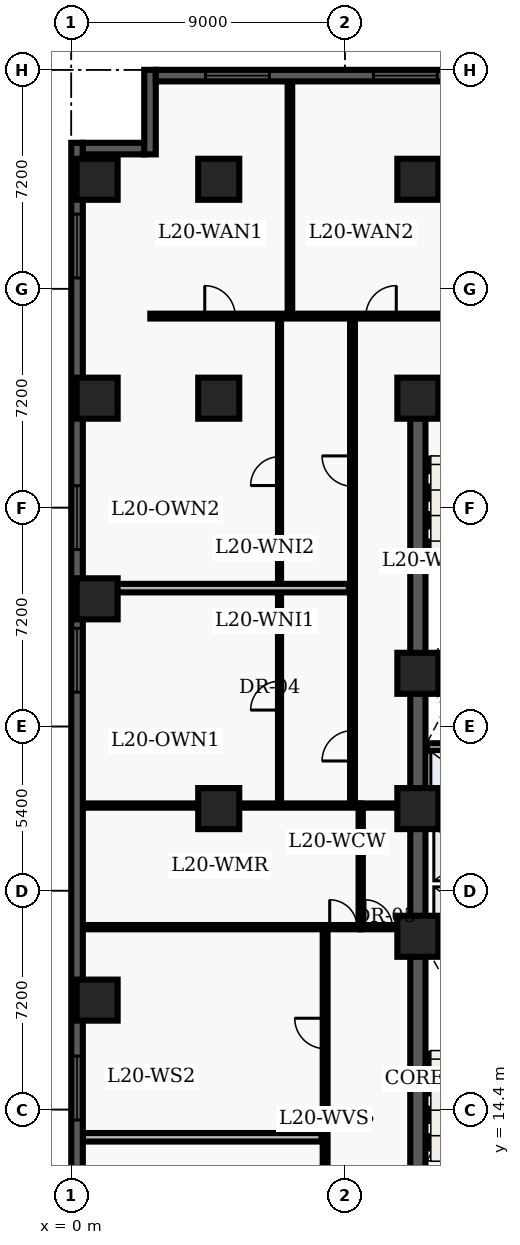
"""IFC4 building model, lengths in metres.
Left out: names, types, materials, properties, quantities, classifications, styles, units other than length and angle.
Written with IfcOpenShell. Run it as: python <this file> out.ifc"""

import sys

from ifc_helpers import new_model, entity, si_unit, converted_unit, direction, frame, origin_with_axes, origin_2d_with_axis, place, context, subcontext, project, spatial, polyline, rectangle, outline, extrude, element, fill, save


model = new_model("IFC4")
c1 = context("Model", 3, precision=1e-05, world=origin_with_axes(), true_north=direction((0.0, 1.0)))
c2 = subcontext(c1, "Body", "Model", "MODEL_VIEW")
j1 = project(units=[si_unit("LENGTHUNIT", "METRE"), converted_unit("PLANEANGLEUNIT", "DEGREE", entity("IfcPlaneAngleMeasure", 0.017), si_unit("PLANEANGLEUNIT", "RADIAN"), dimensions=[0, 0, 0, 0, 0, 0, 0])], contexts=[c1])
p1 = place(None, origin_with_axes())
s1 = spatial("IfcSite", under=j1, at=p1, CompositionType="ELEMENT")
p2 = place(p1, origin_with_axes())
s2 = spatial("IfcBuilding", under=s1, at=p2, CompositionType="ELEMENT")
p3 = place(p2, frame((0.0, 0.0, 84.6), z_axis=(0.0, 0.0, 1.0), x_axis=(1.0, 0.0, 0.0)))
s3 = spatial("IfcBuildingStorey", under=s2, at=p3, CompositionType="ELEMENT", Elevation=84.6)
p4 = place(p3, frame((11.4, 10.8, 0.0), z_axis=(0.0, 0.0, 1.0), x_axis=(0.0, 1.0, 0.0)))
e1 = element("IfcWall", 1, at=p4, inside=s3, PredefinedType="SHEAR", context=c2, shape_type="SweptSolid", body=[
    extrude(outline(polyline([(0.0, -0.25), (27.0, -0.25), (27.0, 0.25), (0.0, 0.25), (0.0, -0.25)])), origin_with_axes(), (0.0, 0.0, 1.0), 4.26),
])
p5 = place(p3, frame((11.4, 37.8, 0.0), z_axis=(0.0, 0.0, 1.0), x_axis=(1.0, 0.0, 0.0)))
e2 = element("IfcWall", 2, at=p5, inside=s3, PredefinedType="SHEAR", context=c2, shape_type="SweptSolid", body=[
    extrude(outline(polyline([(0.0, -0.25), (7.2, -0.25), (7.2, 0.25), (0.0, 0.25), (0.0, -0.25)])), origin_with_axes(), (0.0, 0.0, 1.0), 4.26),
])
p6 = place(p5, frame((2.625, 0.0, 0.0), z_axis=(0.0, 0.0, 1.0), x_axis=(1.0, 0.0, 0.0)))
e3 = element("IfcOpeningElement", 3, at=p6, cuts=e2, PredefinedType="OPENING", context=c2, shape_type="SweptSolid", body=[
    extrude(rectangle(XDim=1.05, YDim=0.52, at=origin_2d_with_axis()), origin_with_axes(), (0.0, 0.0, 1.0), 2.15),
])
for number, where, z_axis, x_axis in (
    (4, (11.65, 19.825, 0.0), (0.0, 0.0, 1.0), (1.0, 0.0, 0.0)),
    (5, (11.65, 28.775, 0.0), (0.0, 0.0, 1.0), (1.0, 0.0, 0.0)),
):
    element("IfcWall", number, at=place(p3, frame(where, z_axis=z_axis, x_axis=x_axis)), inside=s3, PredefinedType="SHEAR", context=c2, shape_type="SweptSolid", body=[
        extrude(outline(polyline([(0.0, -0.125), (6.7, -0.125), (6.7, 0.125), (0.0, 0.125), (0.0, -0.125)])), origin_with_axes(), (0.0, 0.0, 1.0), 4.26),
    ])
p7 = place(p3, frame((11.7, 24.1, 0.0), z_axis=(0.0, 0.0, 1.0), x_axis=(1.0, 0.0, 0.0)))
e6 = element("IfcWall", 6, at=p7, inside=s3, PredefinedType="SOLIDWALL", context=c2, shape_type="SweptSolid", body=[
    extrude(outline(polyline([(0.0, -0.125), (6.6, -0.125), (6.6, 0.125), (0.0, 0.125), (0.0, -0.125)])), origin_with_axes(), (0.0, 0.0, 1.0), 3.3),
])
p8 = place(p7, frame((3.75, 0.0, 0.0), z_axis=(0.0, 0.0, 1.0), x_axis=(1.0, 0.0, 0.0)))
e7 = element("IfcOpeningElement", 7, at=p8, cuts=e6, PredefinedType="OPENING", context=c2, shape_type="SweptSolid", body=[
    extrude(rectangle(XDim=0.9, YDim=0.27, at=origin_2d_with_axis()), origin_with_axes(), (0.0, 0.0, 1.0), 2.15),
])
p9 = place(p3, frame((11.7, 26.325, 0.0), z_axis=(0.0, 0.0, 1.0), x_axis=(1.0, 0.0, 0.0)))
e8 = element("IfcWall", 8, at=p9, inside=s3, PredefinedType="SOLIDWALL", context=c2, shape_type="SweptSolid", body=[
    extrude(outline(polyline([(0.0, -0.125), (6.6, -0.125), (6.6, 0.125), (0.0, 0.125), (0.0, -0.125)])), origin_with_axes(), (0.0, 0.0, 1.0), 3.3),
])
p10 = place(p9, frame((3.5, 0.0, 0.0), z_axis=(0.0, 0.0, 1.0), x_axis=(1.0, 0.0, 0.0)))
e9 = element("IfcOpeningElement", 9, at=p10, cuts=e8, PredefinedType="OPENING", context=c2, shape_type="SweptSolid", body=[
    extrude(rectangle(XDim=0.9, YDim=0.27, at=origin_2d_with_axis()), origin_with_axes(), (0.0, 0.0, 1.0), 2.15),
])
for number, where, z_axis, x_axis in (
    (10, (11.4, 20.1, 0.0), (0.0, 0.0, 1.0), (1.0, 0.0, 0.0)),
    (11, (11.4, 24.3, 0.0), (0.0, 0.0, 1.0), (1.0, 0.0, 0.0)),
    (12, (11.4, 28.75, 0.0), (0.0, 0.0, 1.0), (1.0, 0.0, 0.0)),
    (13, (11.4, 37.8, 0.0), (0.0, 0.0, 1.0), (1.0, 0.0, 0.0)),
    (14, (11.4, 45.0, 0.0), (0.0, 0.0, 1.0), (1.0, 0.0, 0.0)),
    (15, (4.85, 24.3, 0.0), (0.0, 0.0, 1.0), (1.0, 0.0, 0.0)),
    (16, (4.85, 37.8, 0.0), (0.0, 0.0, 1.0), (1.0, 0.0, 0.0)),
    (17, (4.85, 45.0, 0.0), (0.0, 0.0, 1.0), (1.0, 0.0, 0.0)),
    (18, (0.85, 18.0, 0.0), (0.0, 0.0, 1.0), (1.0, 0.0, 0.0)),
    (19, (0.85, 31.2, 0.0), (0.0, 0.0, 1.0), (1.0, 0.0, 0.0)),
    (20, (0.85, 37.8, 0.0), (0.0, 0.0, 1.0), (1.0, 0.0, 0.0)),
    (21, (0.85, 45.0, 0.0), (0.0, 0.0, 1.0), (1.0, 0.0, 0.0)),
):
    element("IfcColumn", number, at=place(p3, frame(where, z_axis=z_axis, x_axis=x_axis)), inside=s3, PredefinedType="COLUMN", context=c2, shape_type="SweptSolid", body=[
        extrude(rectangle(XDim=1.35, YDim=1.35, at=origin_2d_with_axis()), origin_with_axes(), (0.0, 0.0, 1.0), 4.5),
    ])
p11 = place(p3, frame((9.52, 20.4, 0.0), z_axis=(0.0, 0.0, 1.0), x_axis=(0.0, 1.0, 0.0)))
e22 = element("IfcWall", 22, at=p11, inside=s3, PredefinedType="PARTITIONING", context=c2, shape_type="SweptSolid", body=[
    extrude(outline(polyline([(0.0, -0.07), (4.0, -0.07), (4.0, 0.07), (0.0, 0.07), (0.0, -0.07)])), origin_with_axes(), (0.0, 0.0, 1.0), 3.2),
])
p12 = place(p3, frame((9.52, 20.4, 0.0), z_axis=(0.0, 0.0, 1.0), x_axis=(1.0, 0.0, 0.0)))
e23 = element("IfcWall", 23, at=p12, inside=s3, PredefinedType="PARTITIONING", context=c2, shape_type="SweptSolid", body=[
    extrude(outline(polyline([(0.0, -0.07), (1.58, -0.07), (1.58, 0.07), (0.0, 0.07), (0.0, -0.07)])), origin_with_axes(), (0.0, 0.0, 1.0), 3.2),
])
p13 = place(p12, frame((0.59, 0.0, 0.0), z_axis=(0.0, 0.0, 1.0), x_axis=(1.0, 0.0, 0.0)))
e24 = element("IfcOpeningElement", 24, at=p13, cuts=e23, PredefinedType="OPENING", context=c2, shape_type="SweptSolid", body=[
    extrude(rectangle(XDim=0.9, YDim=0.16, at=origin_2d_with_axis()), origin_with_axes(), (0.0, 0.0, 1.0), 2.15),
])
p14 = place(p3, frame((9.52, 24.4, 0.0), z_axis=(0.0, 0.0, 1.0), x_axis=(1.0, 0.0, 0.0)))
e25 = element("IfcWall", 25, at=p14, inside=s3, PredefinedType="PARTITIONING", context=c2, shape_type="SweptSolid", body=[
    extrude(outline(polyline([(0.0, -0.07), (1.58, -0.07), (1.58, 0.07), (0.0, 0.07), (0.0, -0.07)])), origin_with_axes(), (0.0, 0.0, 1.0), 3.2),
])
p15 = place(p3, frame((2.6, 40.5, 0.0), z_axis=(0.0, 0.0, 1.0), x_axis=(1.0, 0.0, 0.0)))
e26 = element("IfcWall", 26, at=p15, inside=s3, PredefinedType="PARTITIONING", context=c2, shape_type="SweptSolid", body=[
    extrude(outline(polyline([(0.0, -0.08), (18.65, -0.08), (18.65, 0.08), (0.0, 0.08), (0.0, -0.08)])), origin_with_axes(), (0.0, 0.0, 1.0), 3.2),
])
p16 = place(p15, frame((2.291, 0.0, 0.0), z_axis=(0.0, 0.0, 1.0), x_axis=(1.0, 0.0, 0.0)))
e27 = element("IfcOpeningElement", 27, at=p16, cuts=e26, PredefinedType="OPENING", context=c2, shape_type="SweptSolid", body=[
    extrude(rectangle(XDim=1.0, YDim=0.18, at=origin_2d_with_axis()), origin_with_axes(), (0.0, 0.0, 1.0), 2.15),
])
p17 = place(p15, frame((7.59, 0.0, 0.0), z_axis=(0.0, 0.0, 1.0), x_axis=(1.0, 0.0, 0.0)))
e28 = element("IfcOpeningElement", 28, at=p17, cuts=e26, PredefinedType="OPENING", context=c2, shape_type="SweptSolid", body=[
    extrude(rectangle(XDim=1.0, YDim=0.18, at=origin_2d_with_axis()), origin_with_axes(), (0.0, 0.0, 1.0), 2.15),
])
p18 = place(p15, frame((13.223, 0.0, 0.0), z_axis=(0.0, 0.0, 1.0), x_axis=(1.0, 0.0, 0.0)))
e29 = element("IfcOpeningElement", 29, at=p18, cuts=e26, PredefinedType="OPENING", context=c2, shape_type="SweptSolid", body=[
    extrude(rectangle(XDim=1.2, YDim=0.18, at=origin_2d_with_axis()), origin_with_axes(), (0.0, 0.0, 1.0), 2.2),
])
p19 = place(p3, frame((8.35, 7.8, 0.0), z_axis=(0.0, 0.0, 1.0), x_axis=(0.0, 1.0, 0.0)))
e30 = element("IfcWall", 30, at=p19, inside=s3, PredefinedType="PARTITIONING", context=c2, shape_type="SweptSolid", body=[
    extrude(outline(polyline([(0.0, -0.08), (12.6, -0.08), (12.6, 0.08), (0.0, 0.08), (0.0, -0.08)])), origin_with_axes(), (0.0, 0.0, 1.0), 3.2),
])
p20 = place(p19, frame((2.909, 0.0, 0.0), z_axis=(0.0, 0.0, 1.0), x_axis=(1.0, 0.0, 0.0)))
e31 = element("IfcOpeningElement", 31, at=p20, cuts=e30, PredefinedType="OPENING", context=c2, shape_type="SweptSolid", body=[
    extrude(rectangle(XDim=1.0, YDim=0.18, at=origin_2d_with_axis()), origin_with_axes(), (0.0, 0.0, 1.0), 2.15),
])
p21 = place(p19, frame((9.104, 0.0, 0.0), z_axis=(0.0, 0.0, 1.0), x_axis=(1.0, 0.0, 0.0)))
e32 = element("IfcOpeningElement", 32, at=p21, cuts=e30, PredefinedType="OPENING", context=c2, shape_type="SweptSolid", body=[
    extrude(rectangle(XDim=1.0, YDim=0.18, at=origin_2d_with_axis()), origin_with_axes(), (0.0, 0.0, 1.0), 2.15),
])
p22 = place(p3, frame((9.25, 24.4, 0.0), z_axis=(0.0, 0.0, 1.0), x_axis=(0.0, 1.0, 0.0)))
e33 = element("IfcWall", 33, at=p22, inside=s3, PredefinedType="PARTITIONING", context=c2, shape_type="SweptSolid", body=[
    extrude(outline(polyline([(0.0, -0.08), (16.1, -0.08), (16.1, 0.08), (0.0, 0.08), (0.0, -0.08)])), origin_with_axes(), (0.0, 0.0, 1.0), 3.2),
])
p23 = place(p22, frame((1.966, 0.0, 0.0), z_axis=(0.0, 0.0, 1.0), x_axis=(1.0, 0.0, 0.0)))
e34 = element("IfcOpeningElement", 34, at=p23, cuts=e33, PredefinedType="OPENING", context=c2, shape_type="SweptSolid", body=[
    extrude(rectangle(XDim=1.0, YDim=0.18, at=origin_2d_with_axis()), origin_with_axes(), (0.0, 0.0, 1.0), 2.15),
])
p24 = place(p22, frame((11.001, 0.0, 0.0), z_axis=(0.0, 0.0, 1.0), x_axis=(1.0, 0.0, 0.0)))
e35 = element("IfcOpeningElement", 35, at=p24, cuts=e33, PredefinedType="OPENING", context=c2, shape_type="SweptSolid", body=[
    extrude(rectangle(XDim=1.0, YDim=0.18, at=origin_2d_with_axis()), origin_with_axes(), (0.0, 0.0, 1.0), 2.15),
])
p25 = place(p3, frame((0.36, 20.4, 0.0), z_axis=(0.0, 0.0, 1.0), x_axis=(1.0, 0.0, 0.0)))
e36 = element("IfcWall", 36, at=p25, inside=s3, PredefinedType="PARTITIONING", context=c2, shape_type="SweptSolid", body=[
    extrude(outline(polyline([(0.0, -0.07), (9.16, -0.07), (9.16, 0.07), (0.0, 0.07), (0.0, -0.07)])), origin_with_axes(), (0.0, 0.0, 1.0), 3.2),
])
p26 = place(p25, frame((8.59, 0.0, 0.0), z_axis=(0.0, 0.0, 1.0), x_axis=(1.0, 0.0, 0.0)))
e37 = element("IfcOpeningElement", 37, at=p26, cuts=e36, PredefinedType="OPENING", context=c2, shape_type="SweptSolid", body=[
    extrude(rectangle(XDim=0.9, YDim=0.16, at=origin_2d_with_axis()), origin_with_axes(), (0.0, 0.0, 1.0), 2.15),
])
p27 = place(p3, frame((0.36, 24.4, 0.0), z_axis=(0.0, 0.0, 1.0), x_axis=(1.0, 0.0, 0.0)))
e38 = element("IfcWall", 38, at=p27, inside=s3, PredefinedType="PARTITIONING", context=c2, shape_type="SweptSolid", body=[
    extrude(outline(polyline([(0.0, -0.07), (9.16, -0.07), (9.16, 0.07), (0.0, 0.07), (0.0, -0.07)])), origin_with_axes(), (0.0, 0.0, 1.0), 3.2),
])
p28 = place(p3, frame((0.375, 13.488, 0.0), z_axis=(0.0, 0.0, 1.0), x_axis=(1.0, 0.0, 0.0)))
e39 = element("IfcWall", 39, at=p28, inside=s3, PredefinedType="PARTITIONING", context=c2, shape_type="SweptSolid", body=[
    extrude(outline(polyline([(0.0, -0.14), (7.855, -0.14), (7.855, 0.14), (0.0, 0.14), (0.0, -0.14)])), origin_with_axes(), (0.0, 0.0, 1.0), 3.2),
])
p29 = place(p3, frame((6.85, 24.55, 0.0), z_axis=(0.0, 0.0, 1.0), x_axis=(0.0, 1.0, 0.0)))
e40 = element("IfcWall", 40, at=p29, inside=s3, PredefinedType="PARTITIONING", context=c2, shape_type="SweptSolid", body=[
    extrude(outline(polyline([(0.0, -0.05), (15.75, -0.05), (15.75, 0.05), (0.0, 0.05), (0.0, -0.05)])), origin_with_axes(), (0.0, 0.0, 1.0), 3.2),
])
p30 = place(p29, frame((3.466, 0.0, 0.0), z_axis=(0.0, 0.0, 1.0), x_axis=(1.0, 0.0, 0.0)))
e41 = element("IfcOpeningElement", 41, at=p30, cuts=e40, PredefinedType="OPENING", context=c2, shape_type="SweptSolid", body=[
    extrude(rectangle(XDim=0.95, YDim=0.12, at=origin_2d_with_axis()), origin_with_axes(), (0.0, 0.0, 1.0), 2.15),
])
p31 = place(p29, frame((10.851, 0.0, 0.0), z_axis=(0.0, 0.0, 1.0), x_axis=(1.0, 0.0, 0.0)))
e42 = element("IfcOpeningElement", 42, at=p31, cuts=e40, PredefinedType="OPENING", context=c2, shape_type="SweptSolid", body=[
    extrude(rectangle(XDim=0.95, YDim=0.12, at=origin_2d_with_axis()), origin_with_axes(), (0.0, 0.0, 1.0), 2.15),
])
p32 = place(p3, frame((0.375, 31.552, 0.0), z_axis=(0.0, 0.0, 1.0), x_axis=(1.0, 0.0, 0.0)))
e43 = element("IfcWall", 43, at=p32, inside=s3, PredefinedType="PARTITIONING", context=c2, shape_type="SweptSolid", body=[
    extrude(outline(polyline([(0.0, -0.14), (8.755, -0.14), (8.755, 0.14), (0.0, 0.14), (0.0, -0.14)])), origin_with_axes(), (0.0, 0.0, 1.0), 3.2),
])
p33 = place(p3, frame((7.192, 40.6, 0.0), z_axis=(0.0, 0.0, 1.0), x_axis=(0.0, 1.0, 0.0)))
e44 = element("IfcWall", 44, at=p33, inside=s3, PredefinedType="PARTITIONING", context=c2, shape_type="SweptSolid", body=[
    extrude(outline(polyline([(0.0, -0.075), (7.64, -0.075), (7.64, 0.075), (0.0, 0.075), (0.0, -0.075)])), origin_with_axes(), (0.0, 0.0, 1.0), 3.2),
])
p34 = place(p3, frame((0.19, 2.78, 0.0), z_axis=(0.0, 0.0, 1.0), x_axis=(0.0, 1.0, 0.0)))
e45 = element("IfcWall", 45, at=p34, inside=s3, PredefinedType="SOLIDWALL", context=c2, shape_type="SweptSolid", body=[
    extrude(outline(polyline([(0.0, -0.19), (43.42, -0.19), (43.42, 0.19), (0.0, 0.19), (0.0, -0.19)])), origin_with_axes(), (0.0, 0.0, 1.0), 4.26),
])
p35 = place(p34, frame((2.946, 0.0, 0.45), z_axis=(0.0, 0.0, 1.0), x_axis=(1.0, 0.0, 0.0)))
e46 = element("IfcOpeningElement", 46, at=p35, cuts=e45, PredefinedType="OPENING", context=c2, shape_type="SweptSolid", body=[
    extrude(rectangle(XDim=2.1, YDim=0.4, at=origin_2d_with_axis()), origin_with_axes(), (0.0, 0.0, 1.0), 2.2),
])
p36 = place(p34, frame((12.328, 0.0, 0.45), z_axis=(0.0, 0.0, 1.0), x_axis=(1.0, 0.0, 0.0)))
e47 = element("IfcOpeningElement", 47, at=p36, cuts=e45, PredefinedType="OPENING", context=c2, shape_type="SweptSolid", body=[
    extrude(rectangle(XDim=2.1, YDim=0.4, at=origin_2d_with_axis()), origin_with_axes(), (0.0, 0.0, 1.0), 2.2),
])
p37 = place(p34, frame((26.401, 0.0, 0.45), z_axis=(0.0, 0.0, 1.0), x_axis=(1.0, 0.0, 0.0)))
e48 = element("IfcOpeningElement", 48, at=p37, cuts=e45, PredefinedType="OPENING", context=c2, shape_type="SweptSolid", body=[
    extrude(rectangle(XDim=2.1, YDim=0.4, at=origin_2d_with_axis()), origin_with_axes(), (0.0, 0.0, 1.0), 2.2),
])
p38 = place(p34, frame((31.092, 0.0, 0.45), z_axis=(0.0, 0.0, 1.0), x_axis=(1.0, 0.0, 0.0)))
e49 = element("IfcOpeningElement", 49, at=p38, cuts=e45, PredefinedType="OPENING", context=c2, shape_type="SweptSolid", body=[
    extrude(rectangle(XDim=2.1, YDim=0.4, at=origin_2d_with_axis()), origin_with_axes(), (0.0, 0.0, 1.0), 2.2),
])
p39 = place(p34, frame((40.024, 0.0, 0.45), z_axis=(0.0, 0.0, 1.0), x_axis=(1.0, 0.0, 0.0)))
e50 = element("IfcOpeningElement", 50, at=p39, cuts=e45, PredefinedType="OPENING", context=c2, shape_type="SweptSolid", body=[
    extrude(rectangle(XDim=2.1, YDim=0.4, at=origin_2d_with_axis()), origin_with_axes(), (0.0, 0.0, 1.0), 2.2),
])
p40 = place(p3, frame((0.38, 46.01, 0.0), z_axis=(0.0, 0.0, 1.0), x_axis=(1.0, 0.0, 0.0)))
e51 = element("IfcWall", 51, at=p40, inside=s3, PredefinedType="SOLIDWALL", context=c2, shape_type="SweptSolid", body=[
    extrude(outline(polyline([(0.0, -0.19), (2.02, -0.19), (2.02, 0.19), (0.0, 0.19), (0.0, -0.19)])), origin_with_axes(), (0.0, 0.0, 1.0), 4.26),
])
p41 = place(p3, frame((2.59, 45.82, 0.0), z_axis=(0.0, 0.0, 1.0), x_axis=(0.0, 1.0, 0.0)))
e52 = element("IfcWall", 52, at=p41, inside=s3, PredefinedType="SOLIDWALL", context=c2, shape_type="SweptSolid", body=[
    extrude(outline(polyline([(0.0, -0.19), (2.78, -0.19), (2.78, 0.19), (0.0, 0.19), (0.0, -0.19)])), origin_with_axes(), (0.0, 0.0, 1.0), 4.26),
])
p42 = place(p3, frame((2.78, 48.41, 0.0), z_axis=(0.0, 0.0, 1.0), x_axis=(1.0, 0.0, 0.0)))
e53 = element("IfcWall", 53, at=p42, inside=s3, PredefinedType="SOLIDWALL", context=c2, shape_type="SweptSolid", body=[
    extrude(outline(polyline([(0.0, -0.19), (16.42, -0.19), (16.42, 0.19), (0.0, 0.19), (0.0, -0.19)])), origin_with_axes(), (0.0, 0.0, 1.0), 4.26),
])
p43 = place(p42, frame((2.687, 0.0, 0.45), z_axis=(0.0, 0.0, 1.0), x_axis=(1.0, 0.0, 0.0)))
e54 = element("IfcOpeningElement", 54, at=p43, cuts=e53, PredefinedType="OPENING", context=c2, shape_type="SweptSolid", body=[
    extrude(rectangle(XDim=2.1, YDim=0.4, at=origin_2d_with_axis()), origin_with_axes(), (0.0, 0.0, 1.0), 2.2),
])
p44 = place(p42, frame((8.21, 0.0, 0.45), z_axis=(0.0, 0.0, 1.0), x_axis=(1.0, 0.0, 0.0)))
e55 = element("IfcOpeningElement", 55, at=p44, cuts=e53, PredefinedType="OPENING", context=c2, shape_type="SweptSolid", body=[
    extrude(rectangle(XDim=2.1, YDim=0.4, at=origin_2d_with_axis()), origin_with_axes(), (0.0, 0.0, 1.0), 2.2),
])
p45 = place(p42, frame((13.283, 0.0, 0.45), z_axis=(0.0, 0.0, 1.0), x_axis=(1.0, 0.0, 0.0)))
e56 = element("IfcOpeningElement", 56, at=p45, cuts=e53, PredefinedType="OPENING", context=c2, shape_type="SweptSolid", body=[
    extrude(rectangle(XDim=2.1, YDim=0.4, at=origin_2d_with_axis()), origin_with_axes(), (0.0, 0.0, 1.0), 2.2),
])
p46 = place(p12, frame((0.59, 0.0, 0.0), z_axis=(0.0, 0.0, 1.0), x_axis=(1.0, 0.0, 0.0)))
e57 = element("IfcDoor", 57, at=p46, inside=s3, OperationType="SINGLE_SWING_LEFT", PredefinedType="DOOR", context=c2, shape_type="SweptSolid", body=[
    extrude(rectangle(XDim=0.9, YDim=0.084, at=origin_2d_with_axis()), origin_with_axes(), (0.0, 0.0, 1.0), 2.15),
])
fill(e24, e57)
p47 = place(p25, frame((8.59, 0.0, 0.0), z_axis=(0.0, 0.0, 1.0), x_axis=(1.0, 0.0, 0.0)))
e58 = element("IfcDoor", 58, at=p47, inside=s3, OperationType="SINGLE_SWING_LEFT", PredefinedType="DOOR", context=c2, shape_type="SweptSolid", body=[
    extrude(rectangle(XDim=0.9, YDim=0.084, at=origin_2d_with_axis()), origin_with_axes(), (0.0, 0.0, 1.0), 2.15),
])
fill(e37, e58)
p48 = place(p19, frame((9.104, 0.0, 0.0), z_axis=(0.0, 0.0, 1.0), x_axis=(1.0, 0.0, 0.0)))
e59 = element("IfcDoor", 59, at=p48, inside=s3, OperationType="SINGLE_SWING_RIGHT", PredefinedType="DOOR", context=c2, shape_type="SweptSolid", body=[
    extrude(rectangle(XDim=1.0, YDim=0.09, at=origin_2d_with_axis()), origin_with_axes(), (0.0, 0.0, 1.0), 2.15),
])
fill(e32, e59)
p49 = place(p29, frame((3.466, 0.0, 0.0), z_axis=(0.0, 0.0, 1.0), x_axis=(1.0, 0.0, 0.0)))
e60 = element("IfcDoor", 60, at=p49, inside=s3, OperationType="SINGLE_SWING_LEFT", PredefinedType="DOOR", context=c2, shape_type="SweptSolid", body=[
    extrude(rectangle(XDim=0.95, YDim=0.06, at=origin_2d_with_axis()), origin_with_axes(), (0.0, 0.0, 1.0), 2.15),
])
fill(e41, e60)
p50 = place(p22, frame((1.966, 0.0, 0.0), z_axis=(0.0, 0.0, 1.0), x_axis=(1.0, 0.0, 0.0)))
e61 = element("IfcDoor", 61, at=p50, inside=s3, OperationType="SINGLE_SWING_LEFT", PredefinedType="DOOR", context=c2, shape_type="SweptSolid", body=[
    extrude(rectangle(XDim=1.0, YDim=0.09, at=origin_2d_with_axis()), origin_with_axes(), (0.0, 0.0, 1.0), 2.15),
])
fill(e34, e61)
p51 = place(p29, frame((10.851, 0.0, 0.0), z_axis=(0.0, 0.0, 1.0), x_axis=(1.0, 0.0, 0.0)))
e62 = element("IfcDoor", 62, at=p51, inside=s3, OperationType="SINGLE_SWING_LEFT", PredefinedType="DOOR", context=c2, shape_type="SweptSolid", body=[
    extrude(rectangle(XDim=0.95, YDim=0.06, at=origin_2d_with_axis()), origin_with_axes(), (0.0, 0.0, 1.0), 2.15),
])
fill(e42, e62)
p52 = place(p22, frame((11.001, 0.0, 0.0), z_axis=(0.0, 0.0, 1.0), x_axis=(1.0, 0.0, 0.0)))
e63 = element("IfcDoor", 63, at=p52, inside=s3, OperationType="SINGLE_SWING_RIGHT", PredefinedType="DOOR", context=c2, shape_type="SweptSolid", body=[
    extrude(rectangle(XDim=1.0, YDim=0.09, at=origin_2d_with_axis()), origin_with_axes(), (0.0, 0.0, 1.0), 2.15),
])
fill(e35, e63)
p53 = place(p15, frame((2.291, 0.0, 0.0), z_axis=(0.0, 0.0, 1.0), x_axis=(1.0, 0.0, 0.0)))
e64 = element("IfcDoor", 64, at=p53, inside=s3, OperationType="SINGLE_SWING_LEFT", PredefinedType="DOOR", context=c2, shape_type="SweptSolid", body=[
    extrude(rectangle(XDim=1.0, YDim=0.09, at=origin_2d_with_axis()), origin_with_axes(), (0.0, 0.0, 1.0), 2.15),
])
fill(e27, e64)
p54 = place(p15, frame((7.59, 0.0, 0.0), z_axis=(0.0, 0.0, 1.0), x_axis=(1.0, 0.0, 0.0)))
e65 = element("IfcDoor", 65, at=p54, inside=s3, OperationType="SINGLE_SWING_RIGHT", PredefinedType="DOOR", context=c2, shape_type="SweptSolid", body=[
    extrude(rectangle(XDim=1.0, YDim=0.09, at=origin_2d_with_axis()), origin_with_axes(), (0.0, 0.0, 1.0), 2.15),
])
fill(e28, e65)
p55 = place(p34, frame((12.328, 0.0, 0.45), z_axis=(0.0, 0.0, 1.0), x_axis=(1.0, 0.0, 0.0)))
e66 = element("IfcWindow", 66, at=p55, inside=s3, PredefinedType="WINDOW", context=c2, shape_type="SweptSolid", body=[
    extrude(rectangle(XDim=2.1, YDim=0.09, at=origin_2d_with_axis()), origin_with_axes(), (0.0, 0.0, 1.0), 2.2),
])
fill(e47, e66)
p56 = place(p34, frame((26.401, 0.0, 0.45), z_axis=(0.0, 0.0, 1.0), x_axis=(1.0, 0.0, 0.0)))
e67 = element("IfcWindow", 67, at=p56, inside=s3, PredefinedType="WINDOW", context=c2, shape_type="SweptSolid", body=[
    extrude(rectangle(XDim=2.1, YDim=0.09, at=origin_2d_with_axis()), origin_with_axes(), (0.0, 0.0, 1.0), 2.2),
])
fill(e48, e67)
p57 = place(p34, frame((31.092, 0.0, 0.45), z_axis=(0.0, 0.0, 1.0), x_axis=(1.0, 0.0, 0.0)))
e68 = element("IfcWindow", 68, at=p57, inside=s3, PredefinedType="WINDOW", context=c2, shape_type="SweptSolid", body=[
    extrude(rectangle(XDim=2.1, YDim=0.09, at=origin_2d_with_axis()), origin_with_axes(), (0.0, 0.0, 1.0), 2.2),
])
fill(e49, e68)
p58 = place(p34, frame((40.024, 0.0, 0.45), z_axis=(0.0, 0.0, 1.0), x_axis=(1.0, 0.0, 0.0)))
e69 = element("IfcWindow", 69, at=p58, inside=s3, PredefinedType="WINDOW", context=c2, shape_type="SweptSolid", body=[
    extrude(rectangle(XDim=2.1, YDim=0.09, at=origin_2d_with_axis()), origin_with_axes(), (0.0, 0.0, 1.0), 2.2),
])
fill(e50, e69)
p59 = place(p42, frame((2.687, 0.0, 0.45), z_axis=(0.0, 0.0, 1.0), x_axis=(1.0, 0.0, 0.0)))
e70 = element("IfcWindow", 70, at=p59, inside=s3, PredefinedType="WINDOW", context=c2, shape_type="SweptSolid", body=[
    extrude(rectangle(XDim=2.1, YDim=0.09, at=origin_2d_with_axis()), origin_with_axes(), (0.0, 0.0, 1.0), 2.2),
])
fill(e54, e70)
p60 = place(p42, frame((8.21, 0.0, 0.45), z_axis=(0.0, 0.0, 1.0), x_axis=(1.0, 0.0, 0.0)))
e71 = element("IfcWindow", 71, at=p60, inside=s3, PredefinedType="WINDOW", context=c2, shape_type="SweptSolid", body=[
    extrude(rectangle(XDim=2.1, YDim=0.09, at=origin_2d_with_axis()), origin_with_axes(), (0.0, 0.0, 1.0), 2.2),
])
fill(e55, e71)
save(model, sys.argv[1])
